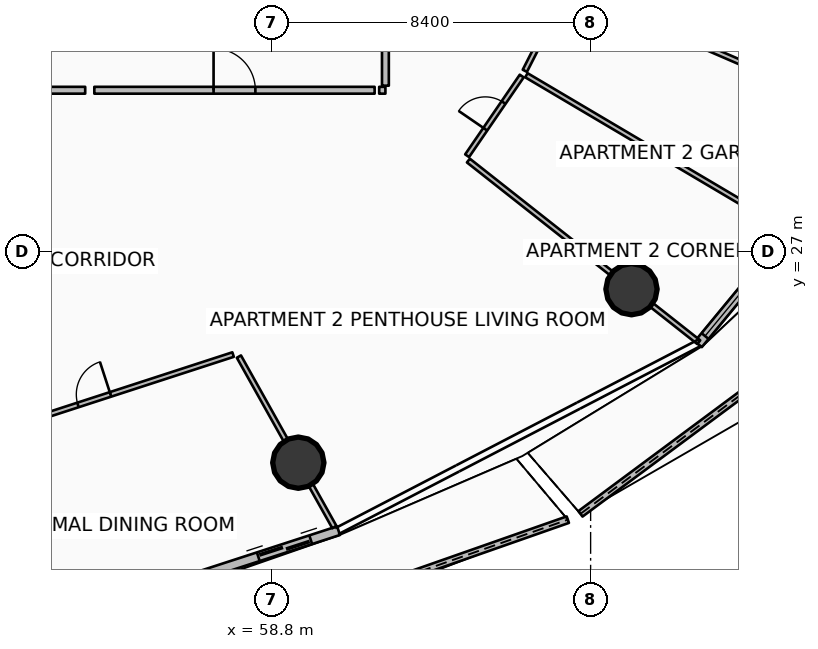
"""IFC4 building model, lengths in metres.
Left out: names, types, materials, properties, quantities, classifications, styles, units other than length and angle.
Written with IfcOpenShell. Run it as: python <this file> out.ifc"""

import sys

from ifc_helpers import new_model, si_unit, direction, frame, frame_2d, origin, origin_2d, place, context, subcontext, project, spatial, polyline, rectangle, circle, outline, extrude, element, fill, save


model = new_model("IFC4")
c1 = context("Model", 3, precision=1e-05, world=origin(), true_north=direction((0.0, 1.0)))
c2 = subcontext(c1, "Body", "Model", "MODEL_VIEW")
j1 = project(units=[si_unit("LENGTHUNIT", "METRE"), si_unit("PLANEANGLEUNIT", "RADIAN")], contexts=[c1])
p1 = place(None, origin())
s1 = spatial("IfcSite", under=j1, at=p1, CompositionType="ELEMENT")
p2 = place(p1, origin())
s2 = spatial("IfcBuilding", under=s1, at=p2, CompositionType="ELEMENT")
p3 = place(p2, frame((0.0, 0.0, 30.15)))
s3 = spatial("IfcBuildingStorey", under=s2, at=p3, CompositionType="ELEMENT", Elevation=30.15)
for number, where, z_axis, x_axis in (
    (1, (59.508, 21.45, 0.0), (0.0, 0.0, 1.0), (1.0, 0.0, 0.0)),
    (2, (68.276, 26.016, 0.0), (0.0, 0.0, 1.0), (1.0, 0.0, 0.0)),
):
    element("IfcColumn", number, at=place(p3, frame(where, z_axis=z_axis, x_axis=x_axis)), inside=s3, PredefinedType="COLUMN", context=c2, shape_type="SweptSolid", body=[
        extrude(circle(Radius=0.675, at=origin_2d()), origin(), (0.0, 0.0, 1.0), 3.5),
    ])
p4 = place(p3, frame((56.447, 16.39, 0.0), z_axis=(0.0, 0.0, 1.0), x_axis=(0.943634553286, 0.330989168772, 0.0)))
e3 = element("IfcWall", 3, at=p4, inside=s3, PredefinedType="PARAPET", context=c2, shape_type="SweptSolid", body=[
    extrude(outline(polyline([(0.0, 0.0), (10.759, 0.0), (10.759, 1.483), (5.379, 1.284), (0.0, 1.148), (0.0, 0.0)])), frame((0.0, 0.09, 0.0), z_axis=(0.0, -1.0, 0.0), x_axis=(1.0, 0.0, 0.0)), (0.0, 0.0, 1.0), 0.18),
])
p5 = place(p3, frame((66.933, 20.104, 0.0), z_axis=(0.0, 0.0, 1.0), x_axis=(0.802947764501, 0.596049400204, 0.0)))
e4 = element("IfcWall", 4, at=p5, inside=s3, PredefinedType="PARAPET", context=c2, shape_type="SweptSolid", body=[
    extrude(outline(polyline([(0.0, 0.0), (12.065, 0.0), (12.066, 1.832), (6.033, 1.696), (0.0, 1.497), (0.0, 0.0)])), frame((0.0, 0.09, 0.0), z_axis=(0.0, -1.0, 0.0), x_axis=(1.0, 0.0, 0.0)), (0.0, 0.0, 1.0), 0.18),
])
p6 = place(p3, frame((50.964, 16.542, 0.0), z_axis=(0.0, 0.0, 1.0), x_axis=(0.951054679225, 0.309022648238, 0.0)))
e5 = element("IfcWall", 5, at=p6, inside=s3, PredefinedType="SOLIDWALL", context=c2, shape_type="SweptSolid", body=[
    extrude(rectangle(XDim=10.097, YDim=0.24, at=frame_2d((5.048, 0.0))), origin(), (0.0, 0.0, 1.0), 2.45),
])
p7 = place(p6, frame((7.877, 0.0, 0.0)))
e6 = element("IfcOpeningElement", 6, at=p7, cuts=e5, PredefinedType="OPENING", context=c2, shape_type="SweptSolid", body=[
    extrude(rectangle(XDim=1.45, YDim=2.15, at=frame_2d((0.725, 1.075))), frame((0.0, 0.13, 0.0), z_axis=(0.0, -1.0, 0.0), x_axis=(1.0, 0.0, 0.0)), (0.0, 0.0, 1.0), 0.26),
])
p8 = place(p6, frame((0.28, 0.0, 0.65)))
e7 = element("IfcOpeningElement", 7, at=p8, cuts=e5, PredefinedType="OPENING", context=c2, shape_type="SweptSolid", body=[
    extrude(rectangle(XDim=1.6, YDim=1.5, at=frame_2d((0.8, 0.75))), frame((0.0, 0.13, 0.0), z_axis=(0.0, -1.0, 0.0), x_axis=(1.0, 0.0, 0.0)), (0.0, 0.0, 1.0), 0.26),
])
p9 = place(p3, frame((70.033, 24.567, 0.0), z_axis=(0.0, 0.0, 1.0), x_axis=(0.636674332663, 0.771132799281, 0.0)))
e8 = element("IfcWall", 8, at=p9, inside=s3, PredefinedType="SOLIDWALL", context=c2, shape_type="SweptSolid", body=[
    extrude(rectangle(XDim=11.851, YDim=0.24, at=frame_2d((5.926, 0.0))), origin(), (0.0, 0.0, 1.0), 2.45),
])
p10 = place(p9, frame((9.631, 0.0, 0.0)))
e9 = element("IfcOpeningElement", 9, at=p10, cuts=e8, PredefinedType="OPENING", context=c2, shape_type="SweptSolid", body=[
    extrude(rectangle(XDim=1.45, YDim=2.15, at=frame_2d((0.725, 1.075))), frame((0.0, 0.13, 0.0), z_axis=(0.0, -1.0, 0.0), x_axis=(1.0, 0.0, 0.0)), (0.0, 0.0, 1.0), 0.26),
])
p11 = place(p9, frame((0.28, 0.0, 0.65)))
e10 = element("IfcOpeningElement", 10, at=p11, cuts=e8, PredefinedType="OPENING", context=c2, shape_type="SweptSolid", body=[
    extrude(rectangle(XDim=1.6, YDim=1.5, at=frame_2d((0.8, 0.75))), frame((0.0, 0.13, 0.0), z_axis=(0.0, -1.0, 0.0), x_axis=(1.0, 0.0, 0.0)), (0.0, 0.0, 1.0), 0.26),
])
p12 = place(p3, frame((54.14, 31.25, 0.0), z_axis=(0.0, 0.0, 1.0), x_axis=(1.0, 0.0, 0.0)))
e11 = element("IfcWall", 11, at=p12, inside=s3, PredefinedType="PARTITIONING", context=c2, shape_type="SweptSolid", body=[
    extrude(rectangle(XDim=7.376, YDim=0.18, at=frame_2d((3.688, 0.0))), origin(), (0.0, 0.0, 1.0), 2.867),
])
p13 = place(p12, frame((3.138, 0.0, 0.0)))
e12 = element("IfcOpeningElement", 12, at=p13, cuts=e11, PredefinedType="OPENING", context=c2, shape_type="SweptSolid", body=[
    extrude(rectangle(XDim=1.1, YDim=2.1, at=frame_2d((0.55, 1.05))), frame((0.0, 0.1, 0.0), z_axis=(0.0, -1.0, 0.0), x_axis=(1.0, 0.0, 0.0)), (0.0, 0.0, 1.0), 0.2),
])
p14 = place(p3, frame((49.392, 31.25, 0.0), z_axis=(0.0, 0.0, 1.0), x_axis=(1.0, 0.0, 0.0)))
e13 = element("IfcWall", 13, at=p14, inside=s3, PredefinedType="PARTITIONING", context=c2, shape_type="SweptSolid", body=[
    extrude(rectangle(XDim=4.508, YDim=0.18, at=frame_2d((2.254, 0.0))), origin(), (0.0, 0.0, 1.0), 2.867),
])
p15 = place(p3, frame((57.945, 24.242, 0.0), z_axis=(0.0, 0.0, 1.0), x_axis=(0.488630834306, -0.872490634772, 0.0)))
e14 = element("IfcWall", 14, at=p15, inside=s3, PredefinedType="PARTITIONING", context=c2, shape_type="SweptSolid", body=[
    extrude(rectangle(XDim=5.143, YDim=0.125, at=frame_2d((2.571, 0.0))), origin(), (0.0, 0.0, 1.0), 2.867),
])
p16 = place(p3, frame((50.485, 21.921, 0.0), z_axis=(0.0, 0.0, 1.0), x_axis=(0.951055318468, 0.309020680883, 0.0)))
e15 = element("IfcWall", 15, at=p16, inside=s3, PredefinedType="PARTITIONING", context=c2, shape_type="SweptSolid", body=[
    extrude(rectangle(XDim=7.682, YDim=0.125, at=frame_2d((3.841, 0.0))), origin(), (0.0, 0.0, 1.0), 2.867),
])
p17 = place(p16, frame((3.391, 0.0, 0.0)))
e16 = element("IfcOpeningElement", 16, at=p17, cuts=e15, PredefinedType="OPENING", context=c2, shape_type="SweptSolid", body=[
    extrude(rectangle(XDim=0.9, YDim=2.08, at=frame_2d((0.45, 1.04))), frame((0.0, 0.073, 0.0), z_axis=(0.0, -1.0, 0.0), x_axis=(1.0, 0.0, 0.0)), (0.0, 0.0, 1.0), 0.145),
])
p18 = place(p3, frame((61.636, 31.25, 0.0), z_axis=(0.0, 0.0, 1.0), x_axis=(1.0, 0.0, 0.0)))
e17 = element("IfcWall", 17, at=p18, inside=s3, PredefinedType="PARTITIONING", context=c2, shape_type="SweptSolid", body=[
    extrude(rectangle(XDim=0.164, YDim=0.18, at=frame_2d((0.082, 0.0))), origin(), (0.0, 0.0, 1.0), 2.867),
])
p19 = place(p3, frame((61.8, 31.37, 0.0), z_axis=(0.0, 0.0, 1.0), x_axis=(0.0, 1.0, 0.0)))
e18 = element("IfcWall", 18, at=p19, inside=s3, PredefinedType="PARTITIONING", context=c2, shape_type="SweptSolid", body=[
    extrude(rectangle(XDim=6.618, YDim=0.18, at=frame_2d((3.309, 0.0))), origin(), (0.0, 0.0, 1.0), 2.867),
])
p20 = place(p3, frame((63.983, 29.4, 0.0), z_axis=(0.0, 0.0, 1.0), x_axis=(0.785322984339, -0.619086270457, 0.0)))
e19 = element("IfcWall", 19, at=p20, inside=s3, PredefinedType="PARTITIONING", context=c2, shape_type="SweptSolid", body=[
    extrude(rectangle(XDim=7.719, YDim=0.125, at=frame_2d((3.86, 0.0))), origin(), (0.0, 0.0, 1.0), 2.867),
])
p21 = place(p3, frame((65.51, 31.645, 0.0), z_axis=(0.0, 0.0, 1.0), x_axis=(0.86074163886, -0.509042072065, 0.0)))
e20 = element("IfcWall", 20, at=p21, inside=s3, PredefinedType="PARTITIONING", context=c2, shape_type="SweptSolid", body=[
    extrude(rectangle(XDim=7.968, YDim=0.125, at=frame_2d((3.984, 0.0))), origin(), (0.0, 0.0, 1.0), 2.94),
])
p22 = place(p3, frame((66.67, 33.921, 0.0), z_axis=(0.0, 0.0, 1.0), x_axis=(0.917747697885, -0.397163899451, 0.0)))
e21 = element("IfcWall", 21, at=p22, inside=s3, PredefinedType="PARTITIONING", context=c2, shape_type="SweptSolid", body=[
    extrude(rectangle(XDim=8.775, YDim=0.125, at=frame_2d((4.387, 0.0))), origin(), (0.0, 0.0, 1.0), 2.94),
])
p23 = place(p3, frame((63.95, 29.528, 0.0), z_axis=(0.0, 0.0, 1.0), x_axis=(0.565358509176, 0.824845292223, 0.0)))
e22 = element("IfcWall", 22, at=p23, inside=s3, PredefinedType="PARTITIONING", context=c2, shape_type="SweptSolid", body=[
    extrude(rectangle(XDim=2.542, YDim=0.125, at=frame_2d((1.271, 0.0))), origin(), (0.0, 0.0, 1.0), 2.867),
])
p24 = place(p23, frame((0.846, 0.0, 0.0)))
e23 = element("IfcOpeningElement", 23, at=p24, cuts=e22, PredefinedType="OPENING", context=c2, shape_type="SweptSolid", body=[
    extrude(rectangle(XDim=0.85, YDim=2.06, at=frame_2d((0.425, 1.03))), frame((0.0, 0.073, 0.0), z_axis=(0.0, -1.0, 0.0), x_axis=(1.0, 0.0, 0.0)), (0.0, 0.0, 1.0), 0.145),
])
p25 = place(p3, frame((65.469, 31.762, 0.0), z_axis=(0.0, 0.0, 1.0), x_axis=(0.45400250644, 0.891000406367, 0.0)))
e24 = element("IfcWall", 24, at=p25, inside=s3, PredefinedType="PARTITIONING", context=c2, shape_type="SweptSolid", body=[
    extrude(rectangle(XDim=2.383, YDim=0.125, at=frame_2d((1.192, 0.0))), origin(), (0.0, 0.0, 1.0), 2.94),
])
p26 = place(p25, frame((0.767, 0.0, 0.0)))
e25 = element("IfcOpeningElement", 25, at=p26, cuts=e24, PredefinedType="OPENING", context=c2, shape_type="SweptSolid", body=[
    extrude(rectangle(XDim=0.85, YDim=2.06, at=frame_2d((0.425, 1.03))), frame((0.0, 0.073, 0.0), z_axis=(0.0, -1.0, 0.0), x_axis=(1.0, 0.0, 0.0)), (0.0, 0.0, 1.0), 0.145),
])
p27 = place(p7, origin())
e26 = element("IfcDoor", 26, at=p27, inside=s3, OperationType="DOUBLE_DOOR_SLIDING", PredefinedType="DOOR", context=c2, shape_type="SweptSolid", body=[
    extrude(rectangle(XDim=1.45, YDim=2.15, at=frame_2d((0.725, 1.075))), frame((0.0, 0.025, 0.0), z_axis=(0.0, -1.0, 0.0), x_axis=(1.0, 0.0, 0.0)), (0.0, 0.0, 1.0), 0.05),
])
fill(e6, e26)
p28 = place(p11, origin())
e27 = element("IfcWindow", 27, at=p28, inside=s3, PartitioningType="SINGLE_PANEL", PredefinedType="WINDOW", context=c2, shape_type="SweptSolid", body=[
    extrude(rectangle(XDim=1.6, YDim=1.5, at=frame_2d((0.8, 0.75))), frame((0.0, 0.03, 0.0), z_axis=(0.0, -1.0, 0.0), x_axis=(1.0, 0.0, 0.0)), (0.0, 0.0, 1.0), 0.06),
])
fill(e10, e27)
p29 = place(p13, origin())
e28 = element("IfcDoor", 28, at=p29, inside=s3, OperationType="SINGLE_SWING_LEFT", PredefinedType="DOOR", context=c2, shape_type="SweptSolid", body=[
    extrude(rectangle(XDim=1.1, YDim=2.1, at=frame_2d((0.55, 1.05))), frame((0.0, 0.025, 0.0), z_axis=(0.0, -1.0, 0.0), x_axis=(1.0, 0.0, 0.0)), (0.0, 0.0, 1.0), 0.05),
])
fill(e12, e28)
p30 = place(p17, origin())
e29 = element("IfcDoor", 29, at=p30, inside=s3, OperationType="SINGLE_SWING_RIGHT", PredefinedType="DOOR", context=c2, shape_type="SweptSolid", body=[
    extrude(rectangle(XDim=0.9, YDim=2.08, at=frame_2d((0.45, 1.04))), frame((0.0, 0.025, 0.0), z_axis=(0.0, -1.0, 0.0), x_axis=(1.0, 0.0, 0.0)), (0.0, 0.0, 1.0), 0.05),
])
fill(e16, e29)
p31 = place(p24, origin())
e30 = element("IfcDoor", 30, at=p31, inside=s3, OperationType="SINGLE_SWING_LEFT", PredefinedType="DOOR", context=c2, shape_type="SweptSolid", body=[
    extrude(rectangle(XDim=0.85, YDim=2.06, at=frame_2d((0.425, 1.03))), frame((0.0, 0.025, 0.0), z_axis=(0.0, -1.0, 0.0), x_axis=(1.0, 0.0, 0.0)), (0.0, 0.0, 1.0), 0.05),
])
fill(e23, e30)
save(model, sys.argv[1])
